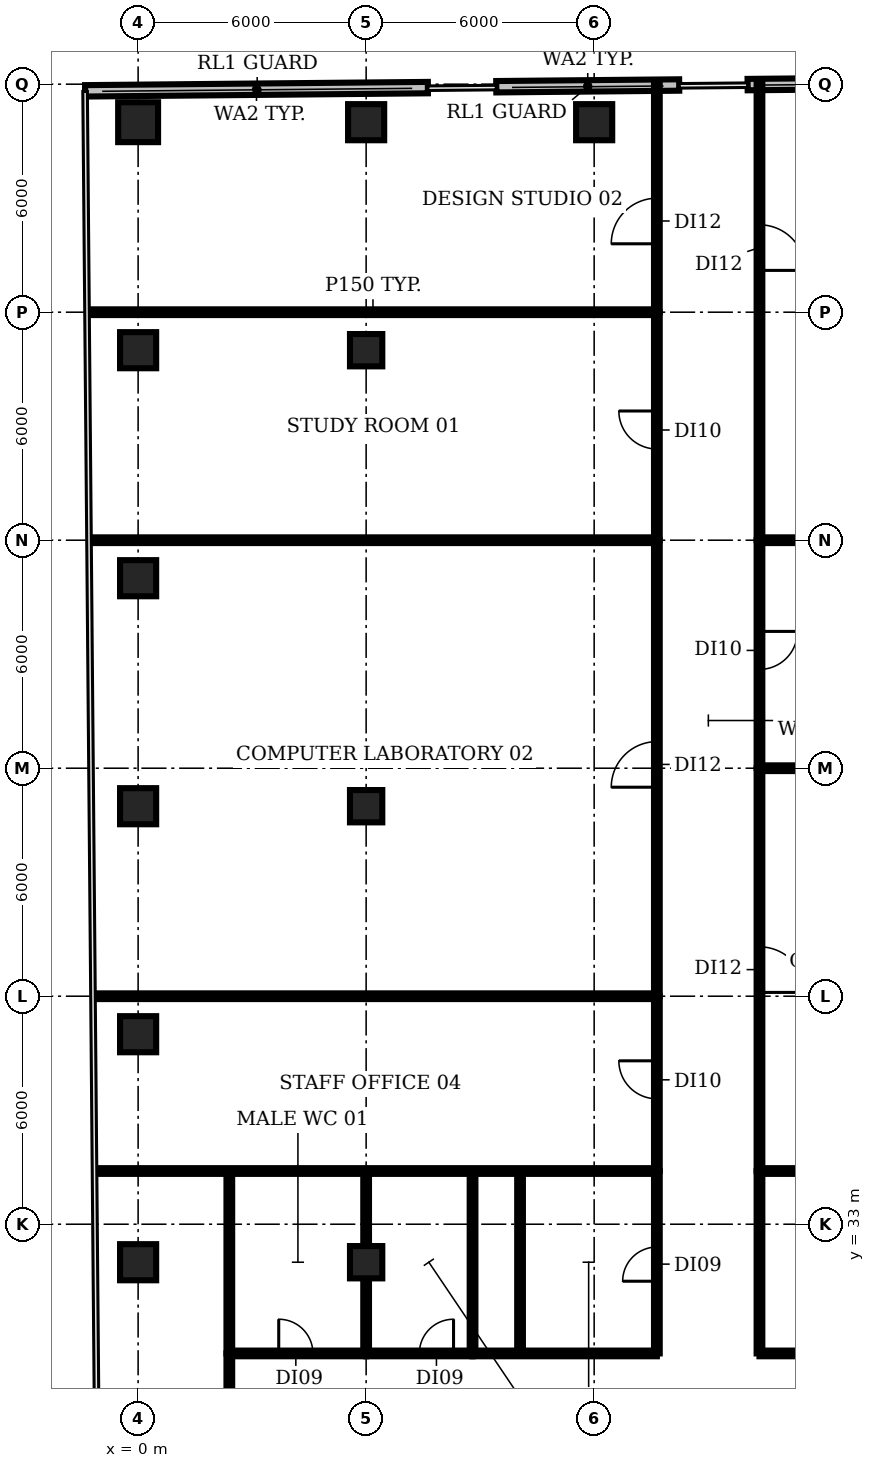
"""IFC4 building model, lengths in metres.
Left out: names, types, materials, properties, quantities, classifications, styles, units other than length and angle.
Written with IfcOpenShell. Run it as: python <this file> out.ifc"""

import sys

from ifc_helpers import new_model, si_unit, direction, frame, frame_2d, origin, origin_2d, place, context, subcontext, project, spatial, rectangle, circle, extrude, element, fill, save


model = new_model("IFC4")
c1 = context("Model", 3, precision=1e-05, world=origin(), true_north=direction((0.0, 1.0)))
c2 = subcontext(c1, "Body", "Model", "MODEL_VIEW")
j1 = project(units=[si_unit("LENGTHUNIT", "METRE"), si_unit("PLANEANGLEUNIT", "RADIAN")], contexts=[c1])
p1 = place(None, origin())
s1 = spatial("IfcSite", under=j1, at=p1, CompositionType="ELEMENT")
p2 = place(p1, origin())
s2 = spatial("IfcBuilding", under=s1, at=p2, CompositionType="ELEMENT")
p3 = place(p2, frame((0.0, 0.0, 54.2)))
s3 = spatial("IfcBuildingStorey", under=s2, at=p3, CompositionType="ELEMENT", Elevation=54.2)
for number, where, z_axis, x_axis in (
    (1, (0.0, 32.0, 0.0), (0.0, 0.0, 1.0), (1.0, 0.0, 0.0)),
    (2, (0.0, 38.0, 0.0), (0.0, 0.0, 1.0), (1.0, 0.0, 0.0)),
    (3, (0.0, 44.0, 0.0), (0.0, 0.0, 1.0), (1.0, 0.0, 0.0)),
    (4, (0.0, 50.0, 0.0), (0.0, 0.0, 1.0), (1.0, 0.0, 0.0)),
    (5, (0.0, 56.0, 0.0), (0.0, 0.0, 1.0), (1.0, 0.0, 0.0)),
):
    element("IfcColumn", number, at=place(p3, frame(where, z_axis=z_axis, x_axis=x_axis)), inside=s3, PredefinedType="COLUMN", context=c2, shape_type="SweptSolid", body=[
        extrude(rectangle(XDim=0.95, YDim=0.95, at=origin_2d()), origin(), (0.0, 0.0, 1.0), 3.85),
    ])
p4 = place(p3, frame((0.0, 62.0, 0.0), z_axis=(0.0, 0.0, 1.0), x_axis=(1.0, 0.0, 0.0)))
e6 = element("IfcColumn", 6, at=p4, inside=s3, PredefinedType="COLUMN", context=c2, shape_type="SweptSolid", body=[
    extrude(circle(Radius=0.525, at=origin_2d()), origin(), (0.0, 0.0, 1.0), 3.85),
])
for number, where, z_axis, x_axis in (
    (7, (6.0, 32.0, 0.0), (0.0, 0.0, 1.0), (1.0, 0.0, 0.0)),
    (8, (6.0, 44.0, 0.0), (0.0, 0.0, 1.0), (1.0, 0.0, 0.0)),
    (9, (6.0, 56.0, 0.0), (0.0, 0.0, 1.0), (1.0, 0.0, 0.0)),
):
    element("IfcColumn", number, at=place(p3, frame(where, z_axis=z_axis, x_axis=x_axis)), inside=s3, PredefinedType="COLUMN", context=c2, shape_type="SweptSolid", body=[
        extrude(rectangle(XDim=0.85, YDim=0.85, at=origin_2d()), origin(), (0.0, 0.0, 1.0), 3.85),
    ])
for number, where, z_axis, x_axis in (
    (10, (6.0, 62.0, 0.0), (0.0, 0.0, 1.0), (1.0, 0.0, 0.0)),
    (11, (12.0, 62.0, 0.0), (0.0, 0.0, 1.0), (1.0, 0.0, 0.0)),
):
    element("IfcColumn", number, at=place(p3, frame(where, z_axis=z_axis, x_axis=x_axis)), inside=s3, PredefinedType="COLUMN", context=c2, shape_type="SweptSolid", body=[
        extrude(rectangle(XDim=0.95, YDim=0.95, at=origin_2d()), origin(), (0.0, 0.0, 1.0), 3.85),
    ])
p5 = place(p3, frame((25.058, 63.074, 0.0), z_axis=(0.0, 0.0, 1.0), x_axis=(-0.999955642737, -0.009418734468, 0.0)))
e12 = element("IfcWall", 12, at=p5, inside=s3, PredefinedType="SOLIDWALL", context=c2, shape_type="SweptSolid", body=[
    extrude(rectangle(XDim=9.021, YDim=0.3, at=frame_2d((4.51, 0.0))), origin(), (0.0, 0.0, 1.0), 3.85),
])
p6 = place(p3, frame((14.238, 62.979, 0.0), z_axis=(0.0, 0.0, 1.0), x_axis=(-0.999955498634, -0.009434020936, 0.0)))
e13 = element("IfcWall", 13, at=p6, inside=s3, PredefinedType="SOLIDWALL", context=c2, shape_type="SweptSolid", body=[
    extrude(rectangle(XDim=4.813, YDim=0.3, at=frame_2d((2.407, 0.0))), origin(), (0.0, 0.0, 1.0), 3.85),
])
p7 = place(p3, frame((7.625, 62.91, 0.0), z_axis=(0.0, 0.0, 1.0), x_axis=(-0.999955642737, -0.009418734468, 0.0)))
e14 = element("IfcWall", 14, at=p7, inside=s3, PredefinedType="SOLIDWALL", context=c2, shape_type="SweptSolid", body=[
    extrude(rectangle(XDim=9.021, YDim=0.3, at=frame_2d((4.51, 0.0))), origin(), (0.0, 0.0, 1.0), 3.85),
])
p8 = place(p3, frame((-1.29, 57.0, 0.0), z_axis=(0.0, 0.0, 1.0), x_axis=(1.0, 0.0, 0.0)))
e15 = element("IfcWall", 15, at=p8, inside=s3, PredefinedType="PARTITIONING", context=c2, shape_type="SweptSolid", body=[
    extrude(rectangle(XDim=14.94, YDim=0.15, at=frame_2d((7.47, 0.0))), origin(), (0.0, 0.0, 1.0), 2.83),
])
p9 = place(p3, frame((-1.24, 51.0, 0.0), z_axis=(0.0, 0.0, 1.0), x_axis=(1.0, 0.0, 0.0)))
e16 = element("IfcWall", 16, at=p9, inside=s3, PredefinedType="PARTITIONING", context=c2, shape_type="SweptSolid", body=[
    extrude(rectangle(XDim=14.89, YDim=0.15, at=frame_2d((7.445, 0.0))), origin(), (0.0, 0.0, 1.0), 2.83),
])
p10 = place(p3, frame((-1.14, 39.0, 0.0), z_axis=(0.0, 0.0, 1.0), x_axis=(1.0, 0.0, 0.0)))
e17 = element("IfcWall", 17, at=p10, inside=s3, PredefinedType="PARTITIONING", context=c2, shape_type="SweptSolid", body=[
    extrude(rectangle(XDim=14.79, YDim=0.15, at=frame_2d((7.395, 0.0))), origin(), (0.0, 0.0, 1.0), 2.83),
])
p11 = place(p3, frame((-1.1, 34.4, 0.0), z_axis=(0.0, 0.0, 1.0), x_axis=(1.0, 0.0, 0.0)))
e18 = element("IfcWall", 18, at=p11, inside=s3, PredefinedType="PARTITIONING", context=c2, shape_type="SweptSolid", body=[
    extrude(rectangle(XDim=14.75, YDim=0.15, at=frame_2d((7.375, 0.0))), origin(), (0.0, 0.0, 1.0), 2.83),
])
p12 = place(p3, frame((2.4, 25.7, 0.0), z_axis=(0.0, 0.0, 1.0), x_axis=(0.0, 1.0, 0.0)))
e19 = element("IfcWall", 19, at=p12, inside=s3, PredefinedType="PARTITIONING", context=c2, shape_type="SweptSolid", body=[
    extrude(rectangle(XDim=3.9, YDim=0.15, at=frame_2d((1.95, 0.0))), origin(), (0.0, 0.0, 1.0), 2.83),
])
p13 = place(p3, frame((2.4, 29.6, 0.0), z_axis=(0.0, 0.0, 1.0), x_axis=(0.0, 1.0, 0.0)))
e20 = element("IfcWall", 20, at=p13, inside=s3, PredefinedType="PARTITIONING", context=c2, shape_type="SweptSolid", body=[
    extrude(rectangle(XDim=4.8, YDim=0.15, at=frame_2d((2.4, 0.0))), origin(), (0.0, 0.0, 1.0), 2.83),
])
p14 = place(p3, frame((2.4, 29.6, 0.0), z_axis=(0.0, 0.0, 1.0), x_axis=(1.0, 0.0, 0.0)))
e21 = element("IfcWall", 21, at=p14, inside=s3, PredefinedType="PARTITIONING", context=c2, shape_type="SweptSolid", body=[
    extrude(rectangle(XDim=3.6, YDim=0.15, at=frame_2d((1.8, 0.0))), origin(), (0.0, 0.0, 1.0), 2.83),
])
p15 = place(p14, frame((1.3, 0.0, 0.0)))
e22 = element("IfcOpeningElement", 22, at=p15, cuts=e21, PredefinedType="OPENING", context=c2, shape_type="SweptSolid", body=[
    extrude(rectangle(XDim=0.9, YDim=2.1, at=frame_2d((0.45, 1.05))), frame((0.0, 0.085, 0.0), z_axis=(0.0, -1.0, 0.0), x_axis=(1.0, 0.0, 0.0)), (0.0, 0.0, 1.0), 0.17),
])
p16 = place(p3, frame((6.0, 29.6, 0.0), z_axis=(0.0, 0.0, 1.0), x_axis=(0.0, 1.0, 0.0)))
e23 = element("IfcWall", 23, at=p16, inside=s3, PredefinedType="PARTITIONING", context=c2, shape_type="SweptSolid", body=[
    extrude(rectangle(XDim=4.8, YDim=0.15, at=frame_2d((2.4, 0.0))), origin(), (0.0, 0.0, 1.0), 2.83),
])
p17 = place(p3, frame((6.0, 29.6, 0.0), z_axis=(0.0, 0.0, 1.0), x_axis=(1.0, 0.0, 0.0)))
e24 = element("IfcWall", 24, at=p17, inside=s3, PredefinedType="PARTITIONING", context=c2, shape_type="SweptSolid", body=[
    extrude(rectangle(XDim=2.8, YDim=0.15, at=frame_2d((1.4, 0.0))), origin(), (0.0, 0.0, 1.0), 2.83),
])
p18 = place(p17, frame((1.4, 0.0, 0.0)))
e25 = element("IfcOpeningElement", 25, at=p18, cuts=e24, PredefinedType="OPENING", context=c2, shape_type="SweptSolid", body=[
    extrude(rectangle(XDim=0.9, YDim=2.1, at=frame_2d((0.45, 1.05))), frame((0.0, 0.085, 0.0), z_axis=(0.0, -1.0, 0.0), x_axis=(1.0, 0.0, 0.0)), (0.0, 0.0, 1.0), 0.17),
])
p19 = place(p3, frame((8.8, 29.6, 0.0), z_axis=(0.0, 0.0, 1.0), x_axis=(0.0, 1.0, 0.0)))
e26 = element("IfcWall", 26, at=p19, inside=s3, PredefinedType="PARTITIONING", context=c2, shape_type="SweptSolid", body=[
    extrude(rectangle(XDim=4.8, YDim=0.15, at=frame_2d((2.4, 0.0))), origin(), (0.0, 0.0, 1.0), 2.83),
])
p20 = place(p3, frame((8.8, 29.6, 0.0), z_axis=(0.0, 0.0, 1.0), x_axis=(1.0, 0.0, 0.0)))
e27 = element("IfcWall", 27, at=p20, inside=s3, PredefinedType="PARTITIONING", context=c2, shape_type="SweptSolid", body=[
    extrude(rectangle(XDim=4.85, YDim=0.15, at=frame_2d((2.425, 0.0))), origin(), (0.0, 0.0, 1.0), 2.83),
])
p21 = place(p3, frame((10.05, 29.6, 0.0), z_axis=(0.0, 0.0, 1.0), x_axis=(0.0, 1.0, 0.0)))
e28 = element("IfcWall", 28, at=p21, inside=s3, PredefinedType="PARTITIONING", context=c2, shape_type="SweptSolid", body=[
    extrude(rectangle(XDim=4.8, YDim=0.15, at=frame_2d((2.4, 0.0))), origin(), (0.0, 0.0, 1.0), 2.83),
])
p22 = place(p3, frame((13.65, 29.6, 0.0), z_axis=(0.0, 0.0, 1.0), x_axis=(0.0, 1.0, 0.0)))
e29 = element("IfcWall", 29, at=p22, inside=s3, PredefinedType="PARTITIONING", context=c2, shape_type="SweptSolid", body=[
    extrude(rectangle(XDim=4.8, YDim=0.15, at=frame_2d((2.4, 0.0))), origin(), (0.0, 0.0, 1.0), 2.83),
])
p23 = place(p22, frame((1.9, 0.0, 0.0)))
e30 = element("IfcOpeningElement", 30, at=p23, cuts=e29, PredefinedType="OPENING", context=c2, shape_type="SweptSolid", body=[
    extrude(rectangle(XDim=0.9, YDim=2.1, at=frame_2d((0.45, 1.05))), frame((0.0, 0.085, 0.0), z_axis=(0.0, -1.0, 0.0), x_axis=(1.0, 0.0, 0.0)), (0.0, 0.0, 1.0), 0.17),
])
p24 = place(p3, frame((13.65, 34.4, 0.0), z_axis=(0.0, 0.0, 1.0), x_axis=(0.0, 1.0, 0.0)))
e31 = element("IfcWall", 31, at=p24, inside=s3, PredefinedType="PARTITIONING", context=c2, shape_type="SweptSolid", body=[
    extrude(rectangle(XDim=4.6, YDim=0.15, at=frame_2d((2.3, 0.0))), origin(), (0.0, 0.0, 1.0), 2.83),
])
p25 = place(p24, frame((1.9, 0.0, 0.0)))
e32 = element("IfcOpeningElement", 32, at=p25, cuts=e31, PredefinedType="OPENING", context=c2, shape_type="SweptSolid", body=[
    extrude(rectangle(XDim=1.0, YDim=2.1, at=frame_2d((0.5, 1.05))), frame((0.0, 0.085, 0.0), z_axis=(0.0, -1.0, 0.0), x_axis=(1.0, 0.0, 0.0)), (0.0, 0.0, 1.0), 0.17),
])
p26 = place(p3, frame((13.65, 39.0, 0.0), z_axis=(0.0, 0.0, 1.0), x_axis=(0.0, 1.0, 0.0)))
e33 = element("IfcWall", 33, at=p26, inside=s3, PredefinedType="PARTITIONING", context=c2, shape_type="SweptSolid", body=[
    extrude(rectangle(XDim=12.0, YDim=0.15, at=frame_2d((6.0, 0.0))), origin(), (0.0, 0.0, 1.0), 2.83),
])
p27 = place(p26, frame((5.5, 0.0, 0.0)))
e34 = element("IfcOpeningElement", 34, at=p27, cuts=e33, PredefinedType="OPENING", context=c2, shape_type="SweptSolid", body=[
    extrude(rectangle(XDim=1.2, YDim=2.1, at=frame_2d((0.6, 1.05))), frame((0.0, 0.085, 0.0), z_axis=(0.0, -1.0, 0.0), x_axis=(1.0, 0.0, 0.0)), (0.0, 0.0, 1.0), 0.17),
])
p28 = place(p3, frame((13.65, 51.0, 0.0), z_axis=(0.0, 0.0, 1.0), x_axis=(0.0, 1.0, 0.0)))
e35 = element("IfcWall", 35, at=p28, inside=s3, PredefinedType="PARTITIONING", context=c2, shape_type="SweptSolid", body=[
    extrude(rectangle(XDim=6.0, YDim=0.15, at=frame_2d((3.0, 0.0))), origin(), (0.0, 0.0, 1.0), 2.83),
])
p29 = place(p28, frame((2.4, 0.0, 0.0)))
e36 = element("IfcOpeningElement", 36, at=p29, cuts=e35, PredefinedType="OPENING", context=c2, shape_type="SweptSolid", body=[
    extrude(rectangle(XDim=1.0, YDim=2.1, at=frame_2d((0.5, 1.05))), frame((0.0, 0.085, 0.0), z_axis=(0.0, -1.0, 0.0), x_axis=(1.0, 0.0, 0.0)), (0.0, 0.0, 1.0), 0.17),
])
p30 = place(p3, frame((13.65, 57.0, 0.0), z_axis=(0.0, 0.0, 1.0), x_axis=(0.0, 1.0, 0.0)))
e37 = element("IfcWall", 37, at=p30, inside=s3, PredefinedType="PARTITIONING", context=c2, shape_type="SweptSolid", body=[
    extrude(rectangle(XDim=6.011, YDim=0.15, at=frame_2d((3.005, 0.0))), origin(), (0.0, 0.0, 1.0), 2.83),
])
p31 = place(p30, frame((1.8, 0.0, 0.0)))
e38 = element("IfcOpeningElement", 38, at=p31, cuts=e37, PredefinedType="OPENING", context=c2, shape_type="SweptSolid", body=[
    extrude(rectangle(XDim=1.2, YDim=2.1, at=frame_2d((0.6, 1.05))), frame((0.0, 0.085, 0.0), z_axis=(0.0, -1.0, 0.0), x_axis=(1.0, 0.0, 0.0)), (0.0, 0.0, 1.0), 0.17),
])
p32 = place(p3, frame((16.35, 29.6, 0.0), z_axis=(0.0, 0.0, 1.0), x_axis=(0.0, 1.0, 0.0)))
e39 = element("IfcWall", 39, at=p32, inside=s3, PredefinedType="PARTITIONING", context=c2, shape_type="SweptSolid", body=[
    extrude(rectangle(XDim=4.8, YDim=0.15, at=frame_2d((2.4, 0.0))), origin(), (0.0, 0.0, 1.0), 2.83),
])
p33 = place(p3, frame((16.35, 29.6, 0.0), z_axis=(0.0, 0.0, 1.0), x_axis=(1.0, 0.0, 0.0)))
e40 = element("IfcWall", 40, at=p33, inside=s3, PredefinedType="PARTITIONING", context=c2, shape_type="SweptSolid", body=[
    extrude(rectangle(XDim=5.06, YDim=0.15, at=frame_2d((2.53, 0.0))), origin(), (0.0, 0.0, 1.0), 2.83),
])
p34 = place(p3, frame((16.35, 34.4, 0.0), z_axis=(0.0, 0.0, 1.0), x_axis=(1.0, 0.0, 0.0)))
e41 = element("IfcWall", 41, at=p34, inside=s3, PredefinedType="PARTITIONING", context=c2, shape_type="SweptSolid", body=[
    extrude(rectangle(XDim=8.66, YDim=0.15, at=frame_2d((4.33, 0.0))), origin(), (0.0, 0.0, 1.0), 2.83),
])
p35 = place(p3, frame((16.35, 45.0, 0.0), z_axis=(0.0, 0.0, 1.0), x_axis=(0.0, -1.0, 0.0)))
e42 = element("IfcWall", 42, at=p35, inside=s3, PredefinedType="PARTITIONING", context=c2, shape_type="SweptSolid", body=[
    extrude(rectangle(XDim=10.6, YDim=0.15, at=frame_2d((5.3, 0.0))), origin(), (0.0, 0.0, 1.0), 2.83),
])
p36 = place(p35, frame((4.7, 0.0, 0.0)))
e43 = element("IfcOpeningElement", 43, at=p36, cuts=e42, PredefinedType="OPENING", context=c2, shape_type="SweptSolid", body=[
    extrude(rectangle(XDim=1.2, YDim=2.1, at=frame_2d((0.6, 1.05))), frame((0.0, 0.085, 0.0), z_axis=(0.0, -1.0, 0.0), x_axis=(1.0, 0.0, 0.0)), (0.0, 0.0, 1.0), 0.17),
])
p37 = place(p3, frame((16.35, 45.0, 0.0), z_axis=(0.0, 0.0, 1.0), x_axis=(1.0, 0.0, 0.0)))
e44 = element("IfcWall", 44, at=p37, inside=s3, PredefinedType="PARTITIONING", context=c2, shape_type="SweptSolid", body=[
    extrude(rectangle(XDim=8.66, YDim=0.15, at=frame_2d((4.33, 0.0))), origin(), (0.0, 0.0, 1.0), 2.83),
])
p38 = place(p3, frame((16.35, 51.0, 0.0), z_axis=(0.0, 0.0, 1.0), x_axis=(0.0, -1.0, 0.0)))
e45 = element("IfcWall", 45, at=p38, inside=s3, PredefinedType="PARTITIONING", context=c2, shape_type="SweptSolid", body=[
    extrude(rectangle(XDim=6.0, YDim=0.15, at=frame_2d((3.0, 0.0))), origin(), (0.0, 0.0, 1.0), 2.83),
])
p39 = place(p38, frame((2.4, 0.0, 0.0)))
e46 = element("IfcOpeningElement", 46, at=p39, cuts=e45, PredefinedType="OPENING", context=c2, shape_type="SweptSolid", body=[
    extrude(rectangle(XDim=1.0, YDim=2.1, at=frame_2d((0.5, 1.05))), frame((0.0, 0.085, 0.0), z_axis=(0.0, -1.0, 0.0), x_axis=(1.0, 0.0, 0.0)), (0.0, 0.0, 1.0), 0.17),
])
p40 = place(p3, frame((16.35, 51.0, 0.0), z_axis=(0.0, 0.0, 1.0), x_axis=(1.0, 0.0, 0.0)))
e47 = element("IfcWall", 47, at=p40, inside=s3, PredefinedType="PARTITIONING", context=c2, shape_type="SweptSolid", body=[
    extrude(rectangle(XDim=8.66, YDim=0.15, at=frame_2d((4.33, 0.0))), origin(), (0.0, 0.0, 1.0), 2.83),
])
p41 = place(p3, frame((16.35, 63.037, 0.0), z_axis=(0.0, 0.0, 1.0), x_axis=(0.0, -1.0, 0.0)))
e48 = element("IfcWall", 48, at=p41, inside=s3, PredefinedType="PARTITIONING", context=c2, shape_type="SweptSolid", body=[
    extrude(rectangle(XDim=12.037, YDim=0.15, at=frame_2d((6.018, 0.0))), origin(), (0.0, 0.0, 1.0), 2.83),
])
p42 = place(p41, frame((3.737, 0.0, 0.0)))
e49 = element("IfcOpeningElement", 49, at=p42, cuts=e48, PredefinedType="OPENING", context=c2, shape_type="SweptSolid", body=[
    extrude(rectangle(XDim=1.2, YDim=2.1, at=frame_2d((0.6, 1.05))), frame((0.0, 0.085, 0.0), z_axis=(0.0, -1.0, 0.0), x_axis=(1.0, 0.0, 0.0)), (0.0, 0.0, 1.0), 0.17),
])
p43 = place(p15, origin())
e50 = element("IfcDoor", 50, at=p43, inside=s3, OperationType="SINGLE_SWING_LEFT", PredefinedType="DOOR", context=c2, shape_type="SweptSolid", body=[
    extrude(rectangle(XDim=0.9, YDim=2.1, at=frame_2d((0.45, 1.05))), frame((0.0, 0.025, 0.0), z_axis=(0.0, -1.0, 0.0), x_axis=(1.0, 0.0, 0.0)), (0.0, 0.0, 1.0), 0.05),
])
fill(e22, e50)
p44 = place(p18, origin())
e51 = element("IfcDoor", 51, at=p44, inside=s3, OperationType="SINGLE_SWING_RIGHT", PredefinedType="DOOR", context=c2, shape_type="SweptSolid", body=[
    extrude(rectangle(XDim=0.9, YDim=2.1, at=frame_2d((0.45, 1.05))), frame((0.0, 0.025, 0.0), z_axis=(0.0, -1.0, 0.0), x_axis=(1.0, 0.0, 0.0)), (0.0, 0.0, 1.0), 0.05),
])
fill(e25, e51)
p45 = place(p23, origin())
e52 = element("IfcDoor", 52, at=p45, inside=s3, OperationType="SINGLE_SWING_LEFT", PredefinedType="DOOR", context=c2, shape_type="SweptSolid", body=[
    extrude(rectangle(XDim=0.9, YDim=2.1, at=frame_2d((0.45, 1.05))), frame((0.0, 0.025, 0.0), z_axis=(0.0, -1.0, 0.0), x_axis=(1.0, 0.0, 0.0)), (0.0, 0.0, 1.0), 0.05),
])
fill(e30, e52)
p46 = place(p25, origin())
e53 = element("IfcDoor", 53, at=p46, inside=s3, OperationType="SINGLE_SWING_RIGHT", PredefinedType="DOOR", context=c2, shape_type="SweptSolid", body=[
    extrude(rectangle(XDim=1.0, YDim=2.1, at=frame_2d((0.5, 1.05))), frame((0.0, 0.025, 0.0), z_axis=(0.0, -1.0, 0.0), x_axis=(1.0, 0.0, 0.0)), (0.0, 0.0, 1.0), 0.05),
])
fill(e32, e53)
p47 = place(p27, origin())
e54 = element("IfcDoor", 54, at=p47, inside=s3, OperationType="SINGLE_SWING_LEFT", PredefinedType="DOOR", context=c2, shape_type="SweptSolid", body=[
    extrude(rectangle(XDim=1.2, YDim=2.1, at=frame_2d((0.6, 1.05))), frame((0.0, 0.025, 0.0), z_axis=(0.0, -1.0, 0.0), x_axis=(1.0, 0.0, 0.0)), (0.0, 0.0, 1.0), 0.05),
])
fill(e34, e54)
p48 = place(p29, origin())
e55 = element("IfcDoor", 55, at=p48, inside=s3, OperationType="SINGLE_SWING_RIGHT", PredefinedType="DOOR", context=c2, shape_type="SweptSolid", body=[
    extrude(rectangle(XDim=1.0, YDim=2.1, at=frame_2d((0.5, 1.05))), frame((0.0, 0.025, 0.0), z_axis=(0.0, -1.0, 0.0), x_axis=(1.0, 0.0, 0.0)), (0.0, 0.0, 1.0), 0.05),
])
fill(e36, e55)
p49 = place(p31, origin())
e56 = element("IfcDoor", 56, at=p49, inside=s3, OperationType="SINGLE_SWING_LEFT", PredefinedType="DOOR", context=c2, shape_type="SweptSolid", body=[
    extrude(rectangle(XDim=1.2, YDim=2.1, at=frame_2d((0.6, 1.05))), frame((0.0, 0.025, 0.0), z_axis=(0.0, -1.0, 0.0), x_axis=(1.0, 0.0, 0.0)), (0.0, 0.0, 1.0), 0.05),
])
fill(e38, e56)
p50 = place(p36, origin())
e57 = element("IfcDoor", 57, at=p50, inside=s3, OperationType="SINGLE_SWING_RIGHT", PredefinedType="DOOR", context=c2, shape_type="SweptSolid", body=[
    extrude(rectangle(XDim=1.2, YDim=2.1, at=frame_2d((0.6, 1.05))), frame((0.0, 0.025, 0.0), z_axis=(0.0, -1.0, 0.0), x_axis=(1.0, 0.0, 0.0)), (0.0, 0.0, 1.0), 0.05),
])
fill(e43, e57)
p51 = place(p39, origin())
e58 = element("IfcDoor", 58, at=p51, inside=s3, OperationType="SINGLE_SWING_LEFT", PredefinedType="DOOR", context=c2, shape_type="SweptSolid", body=[
    extrude(rectangle(XDim=1.0, YDim=2.1, at=frame_2d((0.5, 1.05))), frame((0.0, 0.025, 0.0), z_axis=(0.0, -1.0, 0.0), x_axis=(1.0, 0.0, 0.0)), (0.0, 0.0, 1.0), 0.05),
])
fill(e46, e58)
p52 = place(p42, origin())
e59 = element("IfcDoor", 59, at=p52, inside=s3, OperationType="SINGLE_SWING_RIGHT", PredefinedType="DOOR", context=c2, shape_type="SweptSolid", body=[
    extrude(rectangle(XDim=1.2, YDim=2.1, at=frame_2d((0.6, 1.05))), frame((0.0, 0.025, 0.0), z_axis=(0.0, -1.0, 0.0), x_axis=(1.0, 0.0, 0.0)), (0.0, 0.0, 1.0), 0.05),
])
fill(e49, e59)
save(model, sys.argv[1])
